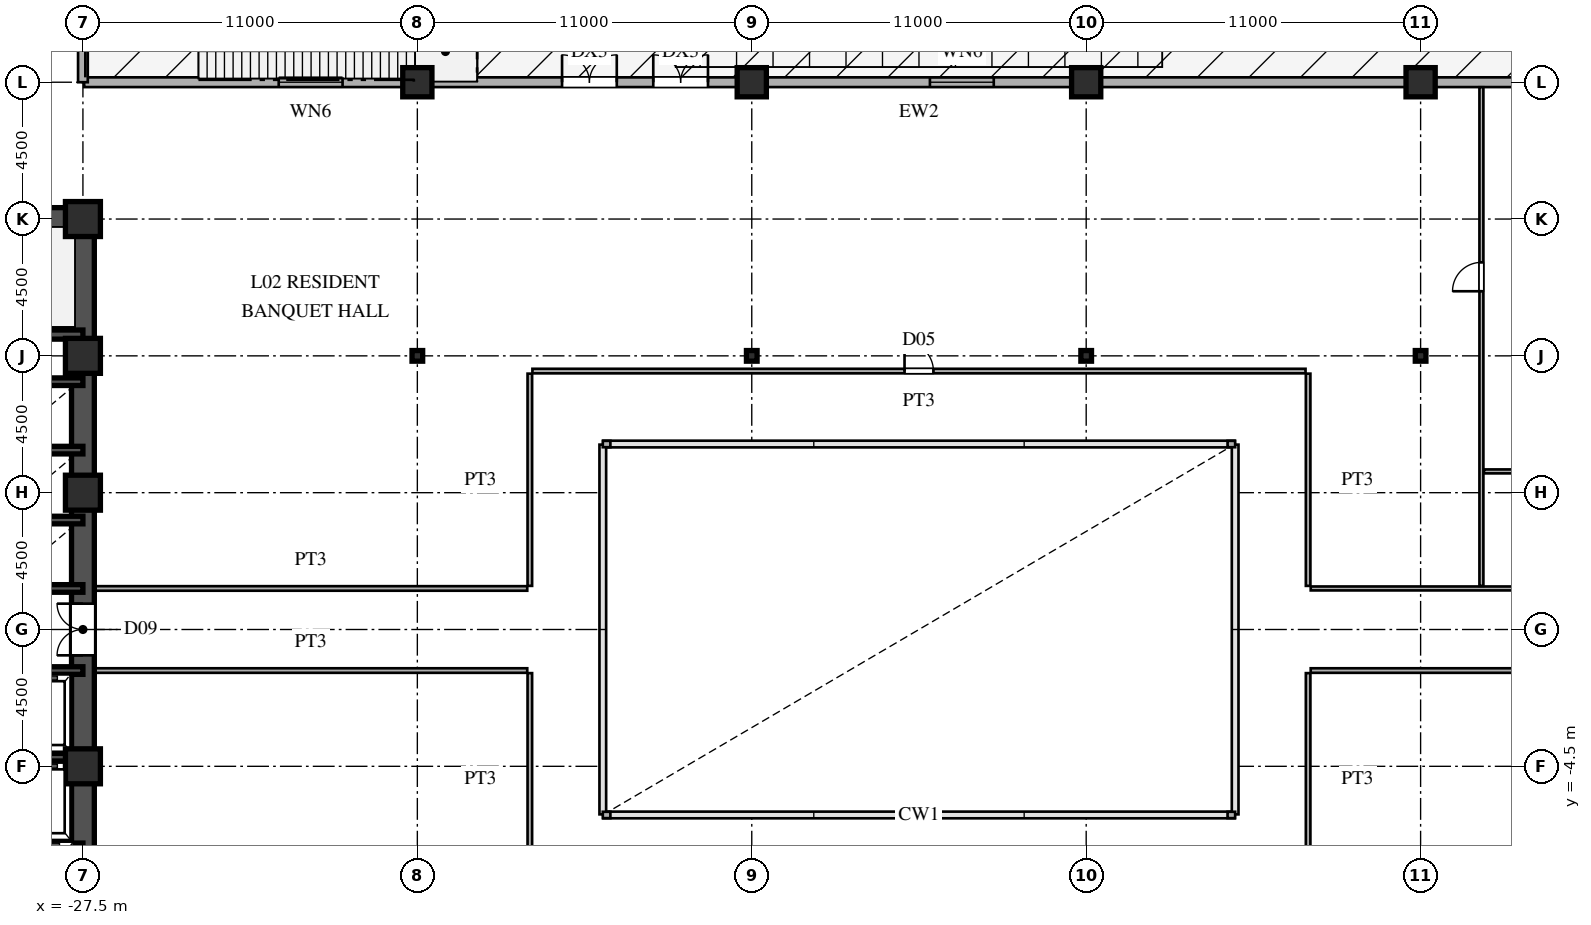
"""IFC4 building model, lengths in metres.
Left out: names, types, materials, properties, quantities, classifications, styles, units other than length and angle.
Written with IfcOpenShell. Run it as: python <this file> out.ifc"""

import sys

from ifc_helpers import new_model, si_unit, direction, frame, frame_2d, origin, origin_2d, place, context, subcontext, project, spatial, rectangle, hollow_rectangle, i_section, extrude, source, transform, mapped, element, fill, save


model = new_model("IFC4")
c1 = context("Model", 3, precision=1e-05, world=origin(), true_north=direction((0.0, 1.0)))
c2 = subcontext(c1, "Body", "Model", "MODEL_VIEW")
j1 = project(units=[si_unit("LENGTHUNIT", "METRE"), si_unit("PLANEANGLEUNIT", "RADIAN")], contexts=[c1])
p1 = place(None, origin())
s1 = spatial("IfcSite", under=j1, at=p1, CompositionType="ELEMENT")
p2 = place(p1, origin())
s2 = spatial("IfcBuilding", under=s1, at=p2, CompositionType="ELEMENT")
p3 = place(p2, frame((0.0, 0.0, 9.9)))
s3 = spatial("IfcBuildingStorey", under=s2, at=p3, CompositionType="ELEMENT", Elevation=9.9)
m1 = source(origin(), c2, "Body", "SweptSolid", [
    extrude(hollow_rectangle(XDim=1.15, YDim=1.15, WallThickness=0.048, at=origin_2d()), origin(), (0.0, 0.0, 1.0), 4.5),
])
for number, where, z_axis, x_axis in (
    (1, (-27.5, -4.5, 0.0), (0.0, 0.0, 1.0), (1.0, 0.0, 0.0)),
    (2, (-27.5, 4.5, 0.0), (0.0, 0.0, 1.0), (1.0, 0.0, 0.0)),
    (3, (-27.5, 9.0, 0.0), (0.0, 0.0, 1.0), (1.0, 0.0, 0.0)),
    (4, (-27.5, 13.5, 0.0), (0.0, 0.0, 1.0), (1.0, 0.0, 0.0)),
):
    element("IfcColumn", number, at=place(p3, frame(where, z_axis=z_axis, x_axis=x_axis)), inside=s3, PredefinedType="COLUMN", context=c2, shape_type="MappedRepresentation", body=[
        mapped(m1, transform((0.0, 0.0, 0.0), scale=1.0)),
    ])
m2 = source(origin(), c2, "Body", "SweptSolid", [
    extrude(i_section(OverallWidth=0.35, OverallDepth=0.35, WebThickness=0.012, FlangeThickness=0.019, at=origin_2d()), origin(), (0.0, 0.0, 1.0), 4.5),
])
p4 = place(p3, frame((-16.5, 9.0, 0.0), z_axis=(0.0, 0.0, 1.0), x_axis=(1.0, 0.0, 0.0)))
e5 = element("IfcColumn", 5, at=p4, inside=s3, PredefinedType="COLUMN", context=c2, shape_type="MappedRepresentation", body=[
    mapped(m2, transform((0.0, 0.0, 0.0), scale=1.0)),
])
m3 = source(origin(), c2, "Body", "SweptSolid", [
    extrude(rectangle(XDim=0.96, YDim=0.96, at=origin_2d()), origin(), (0.0, 0.0, 1.0), 4.5),
])
p5 = place(p3, frame((-16.5, 18.0, 0.0), z_axis=(0.0, 0.0, 1.0), x_axis=(1.0, 0.0, 0.0)))
e6 = element("IfcColumn", 6, at=p5, inside=s3, PredefinedType="COLUMN", context=c2, shape_type="MappedRepresentation", body=[
    mapped(m3, transform((0.0, 0.0, 0.0), scale=1.0)),
])
p6 = place(p3, frame((-5.5, 9.0, 0.0), z_axis=(0.0, 0.0, 1.0), x_axis=(1.0, 0.0, 0.0)))
e7 = element("IfcColumn", 7, at=p6, inside=s3, PredefinedType="COLUMN", context=c2, shape_type="MappedRepresentation", body=[
    mapped(m2, transform((0.0, 0.0, 0.0), scale=1.0)),
])
p7 = place(p3, frame((-5.5, 18.0, 0.0), z_axis=(0.0, 0.0, 1.0), x_axis=(1.0, 0.0, 0.0)))
e8 = element("IfcColumn", 8, at=p7, inside=s3, PredefinedType="COLUMN", context=c2, shape_type="MappedRepresentation", body=[
    mapped(m3, transform((0.0, 0.0, 0.0), scale=1.0)),
])
p8 = place(p3, frame((5.5, 9.0, 0.0), z_axis=(0.0, 0.0, 1.0), x_axis=(1.0, 0.0, 0.0)))
e9 = element("IfcColumn", 9, at=p8, inside=s3, PredefinedType="COLUMN", context=c2, shape_type="MappedRepresentation", body=[
    mapped(m2, transform((0.0, 0.0, 0.0), scale=1.0)),
])
p9 = place(p3, frame((5.5, 18.0, 0.0), z_axis=(0.0, 0.0, 1.0), x_axis=(1.0, 0.0, 0.0)))
e10 = element("IfcColumn", 10, at=p9, inside=s3, PredefinedType="COLUMN", context=c2, shape_type="MappedRepresentation", body=[
    mapped(m3, transform((0.0, 0.0, 0.0), scale=1.0)),
])
p10 = place(p3, frame((16.5, 9.0, 0.0), z_axis=(0.0, 0.0, 1.0), x_axis=(1.0, 0.0, 0.0)))
e11 = element("IfcColumn", 11, at=p10, inside=s3, PredefinedType="COLUMN", context=c2, shape_type="MappedRepresentation", body=[
    mapped(m2, transform((0.0, 0.0, 0.0), scale=1.0)),
])
p11 = place(p3, frame((16.5, 18.0, 0.0), z_axis=(0.0, 0.0, 1.0), x_axis=(1.0, 0.0, 0.0)))
e12 = element("IfcColumn", 12, at=p11, inside=s3, PredefinedType="COLUMN", context=c2, shape_type="MappedRepresentation", body=[
    mapped(m3, transform((0.0, 0.0, 0.0), scale=1.0)),
])
p12 = place(p3, frame((27.46, 18.0, 0.0), z_axis=(0.0, 0.0, 1.0), x_axis=(-1.0, 0.0, 0.0)))
e13 = element("IfcWall", 13, at=p12, inside=s3, PredefinedType="SOLIDWALL", context=c2, shape_type="SweptSolid", body=[
    extrude(rectangle(XDim=54.92, YDim=0.32, at=frame_2d((27.46, 0.0))), origin(), (0.0, 0.0, 1.0), 3.42),
])
p13 = place(p12, frame((34.4, 0.0, 0.0)))
e14 = element("IfcOpeningElement", 14, at=p13, cuts=e13, PredefinedType="OPENING", context=c2, shape_type="SweptSolid", body=[
    extrude(rectangle(XDim=1.8, YDim=2.3, at=frame_2d((0.9, 1.15))), frame((0.0, 0.17, 0.0), z_axis=(0.0, -1.0, 0.0), x_axis=(1.0, 0.0, 0.0)), (0.0, 0.0, 1.0), 0.34),
])
p14 = place(p12, frame((37.4, 0.0, 0.0)))
e15 = element("IfcOpeningElement", 15, at=p14, cuts=e13, PredefinedType="OPENING", context=c2, shape_type="SweptSolid", body=[
    extrude(rectangle(XDim=1.8, YDim=2.3, at=frame_2d((0.9, 1.15))), frame((0.0, 0.17, 0.0), z_axis=(0.0, -1.0, 0.0), x_axis=(1.0, 0.0, 0.0)), (0.0, 0.0, 1.0), 0.34),
])
p15 = place(p12, frame((4.5, 0.0, 0.8)))
e16 = element("IfcOpeningElement", 16, at=p15, cuts=e13, PredefinedType="OPENING", context=c2, shape_type="SweptSolid", body=[
    extrude(rectangle(XDim=2.1, YDim=2.0, at=frame_2d((1.05, 1.0))), frame((0.0, 0.17, 0.0), z_axis=(0.0, -1.0, 0.0), x_axis=(1.0, 0.0, 0.0)), (0.0, 0.0, 1.0), 0.34),
])
p16 = place(p12, frame((25.0, 0.0, 0.8)))
e17 = element("IfcOpeningElement", 17, at=p16, cuts=e13, PredefinedType="OPENING", context=c2, shape_type="SweptSolid", body=[
    extrude(rectangle(XDim=2.1, YDim=2.0, at=frame_2d((1.05, 1.0))), frame((0.0, 0.17, 0.0), z_axis=(0.0, -1.0, 0.0), x_axis=(1.0, 0.0, 0.0)), (0.0, 0.0, 1.0), 0.34),
])
p17 = place(p12, frame((46.42, 0.0, 0.8)))
e18 = element("IfcOpeningElement", 18, at=p17, cuts=e13, PredefinedType="OPENING", context=c2, shape_type="SweptSolid", body=[
    extrude(rectangle(XDim=2.1, YDim=2.0, at=frame_2d((1.05, 1.0))), frame((0.0, 0.17, 0.0), z_axis=(0.0, -1.0, 0.0), x_axis=(1.0, 0.0, 0.0)), (0.0, 0.0, 1.0), 0.34),
])
p18 = place(p3, frame((-27.5, 18.0, 0.0), z_axis=(0.0, 0.0, 1.0), x_axis=(0.0, 1.0, 0.0)))
e19 = element("IfcWall", 19, at=p18, inside=s3, PredefinedType="SOLIDWALL", context=c2, shape_type="SweptSolid", body=[
    extrude(rectangle(XDim=5.476, YDim=0.32, at=frame_2d((2.738, 0.0))), origin(), (0.0, 0.0, 1.0), 3.632),
])
for number, where, z_axis, x_axis in (
    (20, (-10.4, -6.1, 0.0), (0.0, 0.0, 1.0), (1.0, 0.0, 0.0)),
    (21, (10.4, -6.1, 0.0), (0.0, 0.0, 1.0), (-1.0, 0.0, 0.0)),
    (22, (10.4, 6.1, 0.0), (0.0, 0.0, 1.0), (-1.0, 0.0, 0.0)),
    (23, (-10.4, 6.1, 0.0), (0.0, 0.0, 1.0), (1.0, 0.0, 0.0)),
):
    element("IfcWall", number, at=place(p3, frame(where, z_axis=z_axis, x_axis=x_axis)), inside=s3, PredefinedType="SOLIDWALL", context=c2, shape_type="SweptSolid", body=[
        extrude(rectangle(XDim=0.25, YDim=0.21, at=frame_2d((0.125, 0.0))), origin(), (0.0, 0.0, 1.0), 4.22),
    ])
for number, where, z_axis, x_axis in (
    (24, (-27.5, -13.5, 0.0), (0.0, 0.0, 1.0), (0.0, 1.0, 0.0)),
    (25, (-27.5, 1.3, 0.0), (0.0, 0.0, 1.0), (0.0, 1.0, 0.0)),
):
    element("IfcWall", number, at=place(p3, frame(where, z_axis=z_axis, x_axis=x_axis)), inside=s3, PredefinedType="SHEAR", context=c2, shape_type="SweptSolid", body=[
        extrude(rectangle(XDim=12.2, YDim=0.75, at=frame_2d((6.1, 0.0))), origin(), (0.0, 0.0, 1.0), 4.22),
    ])
p19 = place(p3, frame((-27.5, -1.3, 0.0), z_axis=(0.0, 0.0, 1.0), x_axis=(0.0, 1.0, 0.0)))
e26 = element("IfcWall", 26, at=p19, inside=s3, PredefinedType="SHEAR", context=c2, shape_type="SweptSolid", body=[
    extrude(rectangle(XDim=2.6, YDim=0.75, at=frame_2d((1.3, 0.0))), origin(), (0.0, 0.0, 1.0), 4.22),
])
p20 = place(p19, frame((0.45, 0.0, 0.0)))
e27 = element("IfcOpeningElement", 27, at=p20, cuts=e26, PredefinedType="OPENING", context=c2, shape_type="SweptSolid", body=[
    extrude(rectangle(XDim=1.7, YDim=2.35, at=frame_2d((0.85, 1.175))), frame((0.0, 0.385, 0.0), z_axis=(0.0, -1.0, 0.0), x_axis=(1.0, 0.0, 0.0)), (0.0, 0.0, 1.0), 0.77),
])
p21 = place(p3, frame((-36.5, 13.5, 0.0), z_axis=(0.0, 0.0, 1.0), x_axis=(1.0, 0.0, 0.0)))
e28 = element("IfcWall", 28, at=p21, inside=s3, PredefinedType="SHEAR", context=c2, shape_type="SweptSolid", body=[
    extrude(rectangle(XDim=9.0, YDim=0.75, at=frame_2d((4.5, 0.0))), origin(), (0.0, 0.0, 1.0), 4.22),
])
p22 = place(p3, frame((-36.5, 9.7, 0.0), z_axis=(0.0, 0.0, 1.0), x_axis=(1.0, 0.0, 0.0)))
e29 = element("IfcWall", 29, at=p22, inside=s3, PredefinedType="SHEAR", context=c2, shape_type="SweptSolid", body=[
    extrude(rectangle(XDim=9.0, YDim=0.3, at=frame_2d((4.5, 0.0))), origin(), (0.0, 0.0, 1.0), 4.22),
])
p23 = place(p22, frame((0.6, 0.0, 0.0)))
e30 = element("IfcOpeningElement", 30, at=p23, cuts=e29, PredefinedType="OPENING", context=c2, shape_type="SweptSolid", body=[
    extrude(rectangle(XDim=1.1, YDim=2.2, at=frame_2d((0.55, 1.1))), frame((0.0, 0.16, 0.0), z_axis=(0.0, -1.0, 0.0), x_axis=(1.0, 0.0, 0.0)), (0.0, 0.0, 1.0), 0.32),
])
for number, where, z_axis, x_axis in (
    (31, (-30.3, -7.15, 0.0), (0.0, 0.0, 1.0), (1.0, 0.0, 0.0)),
    (32, (-30.3, -4.2, 0.0), (0.0, 0.0, 1.0), (1.0, 0.0, 0.0)),
    (33, (-30.3, -1.35, 0.0), (0.0, 0.0, 1.0), (1.0, 0.0, 0.0)),
    (34, (-30.3, 1.35, 0.0), (0.0, 0.0, 1.0), (1.0, 0.0, 0.0)),
    (35, (-30.3, 3.6, 0.0), (0.0, 0.0, 1.0), (1.0, 0.0, 0.0)),
    (36, (-30.3, 5.9, 0.0), (0.0, 0.0, 1.0), (1.0, 0.0, 0.0)),
    (37, (-30.3, 8.15, 0.0), (0.0, 0.0, 1.0), (1.0, 0.0, 0.0)),
):
    element("IfcWall", number, at=place(p3, frame(where, z_axis=z_axis, x_axis=x_axis)), inside=s3, PredefinedType="SHEAR", context=c2, shape_type="SweptSolid", body=[
        extrude(rectangle(XDim=2.8, YDim=0.25, at=frame_2d((1.4, 0.0))), origin(), (0.0, 0.0, 1.0), 4.22),
    ])
for number, where, z_axis, x_axis in (
    (38, (-27.12, -1.35, 0.0), (0.0, 0.0, 1.0), (1.0, 0.0, 0.0)),
    (39, (12.885, -1.35, 0.0), (0.0, 0.0, 1.0), (1.0, 0.0, 0.0)),
    (40, (-27.12, 1.35, 0.0), (0.0, 0.0, 1.0), (1.0, 0.0, 0.0)),
):
    element("IfcWall", number, at=place(p3, frame(where, z_axis=z_axis, x_axis=x_axis)), inside=s3, PredefinedType="PARTITIONING", context=c2, shape_type="SweptSolid", body=[
        extrude(rectangle(XDim=14.235, YDim=0.15, at=frame_2d((7.118, 0.0))), origin(), (0.0, 0.0, 1.0), 4.22),
    ])
p24 = place(p3, frame((12.885, 1.35, 0.0), z_axis=(0.0, 0.0, 1.0), x_axis=(1.0, 0.0, 0.0)))
e41 = element("IfcWall", 41, at=p24, inside=s3, PredefinedType="PARTITIONING", context=c2, shape_type="SweptSolid", body=[
    extrude(rectangle(XDim=14.235, YDim=0.13, at=frame_2d((7.118, 0.0))), origin(), (0.0, 0.0, 1.0), 4.22),
])
p25 = place(p24, frame((7.425, 0.0, 0.0)))
e42 = element("IfcOpeningElement", 42, at=p25, cuts=e41, PredefinedType="OPENING", context=c2, shape_type="SweptSolid", body=[
    extrude(rectangle(XDim=0.88, YDim=2.1, at=frame_2d((0.44, 1.05))), frame((0.0, 0.075, 0.0), z_axis=(0.0, -1.0, 0.0), x_axis=(1.0, 0.0, 0.0)), (0.0, 0.0, 1.0), 0.15),
])
p26 = place(p24, frame((11.775, 0.0, 0.0)))
e43 = element("IfcOpeningElement", 43, at=p26, cuts=e41, PredefinedType="OPENING", context=c2, shape_type="SweptSolid", body=[
    extrude(rectangle(XDim=0.88, YDim=2.1, at=frame_2d((0.44, 1.05))), frame((0.0, 0.075, 0.0), z_axis=(0.0, -1.0, 0.0), x_axis=(1.0, 0.0, 0.0)), (0.0, 0.0, 1.0), 0.15),
])
p27 = place(p3, frame((18.585, 5.2, 0.0), z_axis=(0.0, 0.0, 1.0), x_axis=(1.0, 0.0, 0.0)))
e44 = element("IfcWall", 44, at=p27, inside=s3, PredefinedType="PARTITIONING", context=c2, shape_type="SweptSolid", body=[
    extrude(rectangle(XDim=8.535, YDim=0.13, at=frame_2d((4.268, 0.0))), origin(), (0.0, 0.0, 1.0), 4.22),
])
p28 = place(p3, frame((-12.715, 8.5, 0.0), z_axis=(0.0, 0.0, 1.0), x_axis=(1.0, 0.0, 0.0)))
e45 = element("IfcWall", 45, at=p28, inside=s3, PredefinedType="PARTITIONING", context=c2, shape_type="SweptSolid", body=[
    extrude(rectangle(XDim=25.43, YDim=0.15, at=frame_2d((12.715, 0.0))), origin(), (0.0, 0.0, 1.0), 4.22),
])
p29 = place(p28, frame((12.24, 0.0, 0.0)))
e46 = element("IfcOpeningElement", 46, at=p29, cuts=e45, PredefinedType="OPENING", context=c2, shape_type="SweptSolid", body=[
    extrude(rectangle(XDim=0.95, YDim=2.15, at=frame_2d((0.475, 1.075))), frame((0.0, 0.085, 0.0), z_axis=(0.0, -1.0, 0.0), x_axis=(1.0, 0.0, 0.0)), (0.0, 0.0, 1.0), 0.17),
])
for number, where, z_axis, x_axis in (
    (47, (-12.8, -8.415, 0.0), (0.0, 0.0, 1.0), (0.0, 1.0, 0.0)),
    (48, (-12.8, 1.435, 0.0), (0.0, 0.0, 1.0), (0.0, 1.0, 0.0)),
    (49, (12.8, -8.415, 0.0), (0.0, 0.0, 1.0), (0.0, 1.0, 0.0)),
    (50, (12.8, 1.435, 0.0), (0.0, 0.0, 1.0), (0.0, 1.0, 0.0)),
):
    element("IfcWall", number, at=place(p3, frame(where, z_axis=z_axis, x_axis=x_axis)), inside=s3, PredefinedType="PARTITIONING", context=c2, shape_type="SweptSolid", body=[
        extrude(rectangle(XDim=6.98, YDim=0.15, at=frame_2d((3.49, 0.0))), origin(), (0.0, 0.0, 1.0), 4.22),
    ])
p30 = place(p3, frame((18.5, 1.435, 0.0), z_axis=(0.0, 0.0, 1.0), x_axis=(0.0, 1.0, 0.0)))
e51 = element("IfcWall", 51, at=p30, inside=s3, PredefinedType="PARTITIONING", context=c2, shape_type="SweptSolid", body=[
    extrude(rectangle(XDim=16.4, YDim=0.13, at=frame_2d((8.2, 0.0))), origin(), (0.0, 0.0, 1.0), 4.22),
])
p31 = place(p30, frame((9.69, 0.0, 0.0)))
e52 = element("IfcOpeningElement", 52, at=p31, cuts=e51, PredefinedType="OPENING", context=c2, shape_type="SweptSolid", body=[
    extrude(rectangle(XDim=0.95, YDim=2.15, at=frame_2d((0.475, 1.075))), frame((0.0, 0.075, 0.0), z_axis=(0.0, -1.0, 0.0), x_axis=(1.0, 0.0, 0.0)), (0.0, 0.0, 1.0), 0.15),
])
m4 = source(origin(), c2, "Body", "SweptSolid", [
    extrude(rectangle(XDim=1.8, YDim=2.3, at=frame_2d((0.9, 1.15))), frame((0.0, 0.025, 0.0), z_axis=(0.0, -1.0, 0.0), x_axis=(1.0, 0.0, 0.0)), (0.0, 0.0, 1.0), 0.05),
])
p32 = place(p13, frame((1.8, 0.0, 0.0), z_axis=(0.0, 0.0, 1.0), x_axis=(-1.0, 0.0, 0.0)))
e53 = element("IfcDoor", 53, at=p32, inside=s3, OperationType="DOUBLE_SWING_LEFT", PredefinedType="DOOR", context=c2, shape_type="MappedRepresentation", body=[
    mapped(m4, transform((0.0, 0.0, 0.0), scale=1.0)),
])
fill(e14, e53)
p33 = place(p14, frame((1.8, 0.0, 0.0), z_axis=(0.0, 0.0, 1.0), x_axis=(-1.0, 0.0, 0.0)))
e54 = element("IfcDoor", 54, at=p33, inside=s3, OperationType="DOUBLE_SWING_LEFT", PredefinedType="DOOR", context=c2, shape_type="MappedRepresentation", body=[
    mapped(m4, transform((0.0, 0.0, 0.0), scale=1.0)),
])
fill(e15, e54)
m5 = source(origin(), c2, "Body", "SweptSolid", [
    extrude(rectangle(XDim=2.1, YDim=2.0, at=frame_2d((1.05, 1.0))), frame((0.0, 0.03, 0.0), z_axis=(0.0, -1.0, 0.0), x_axis=(1.0, 0.0, 0.0)), (0.0, 0.0, 1.0), 0.06),
])
p34 = place(p16, origin())
e55 = element("IfcWindow", 55, at=p34, inside=s3, PartitioningType="SINGLE_PANEL", PredefinedType="WINDOW", context=c2, shape_type="MappedRepresentation", body=[
    mapped(m5, transform((0.0, 0.0, 0.0), scale=1.0)),
])
fill(e17, e55)
p35 = place(p17, origin())
e56 = element("IfcWindow", 56, at=p35, inside=s3, PartitioningType="SINGLE_PANEL", PredefinedType="WINDOW", context=c2, shape_type="MappedRepresentation", body=[
    mapped(m5, transform((0.0, 0.0, 0.0), scale=1.0)),
])
fill(e18, e56)
m6 = source(origin(), c2, "Body", "SweptSolid", [
    extrude(rectangle(XDim=1.7, YDim=2.35, at=frame_2d((0.85, 1.175))), frame((0.0, 0.025, 0.0), z_axis=(0.0, -1.0, 0.0), x_axis=(1.0, 0.0, 0.0)), (0.0, 0.0, 1.0), 0.05),
])
p36 = place(p20, origin())
e57 = element("IfcDoor", 57, at=p36, inside=s3, OperationType="DOUBLE_SWING_LEFT", PredefinedType="DOOR", context=c2, shape_type="MappedRepresentation", body=[
    mapped(m6, transform((0.0, 0.0, 0.0), scale=1.0)),
])
fill(e27, e57)
m7 = source(origin(), c2, "Body", "SweptSolid", [
    extrude(rectangle(XDim=0.95, YDim=2.15, at=frame_2d((0.475, 1.075))), frame((0.0, 0.025, 0.0), z_axis=(0.0, -1.0, 0.0), x_axis=(1.0, 0.0, 0.0)), (0.0, 0.0, 1.0), 0.05),
])
p37 = place(p29, origin())
e58 = element("IfcDoor", 58, at=p37, inside=s3, OperationType="SINGLE_SWING_LEFT", PredefinedType="DOOR", context=c2, shape_type="MappedRepresentation", body=[
    mapped(m7, transform((0.0, 0.0, 0.0), scale=1.0)),
])
fill(e46, e58)
p38 = place(p31, origin())
e59 = element("IfcDoor", 59, at=p38, inside=s3, OperationType="SINGLE_SWING_LEFT", PredefinedType="DOOR", context=c2, shape_type="MappedRepresentation", body=[
    mapped(m7, transform((0.0, 0.0, 0.0), scale=1.0)),
])
fill(e52, e59)
save(model, sys.argv[1])
